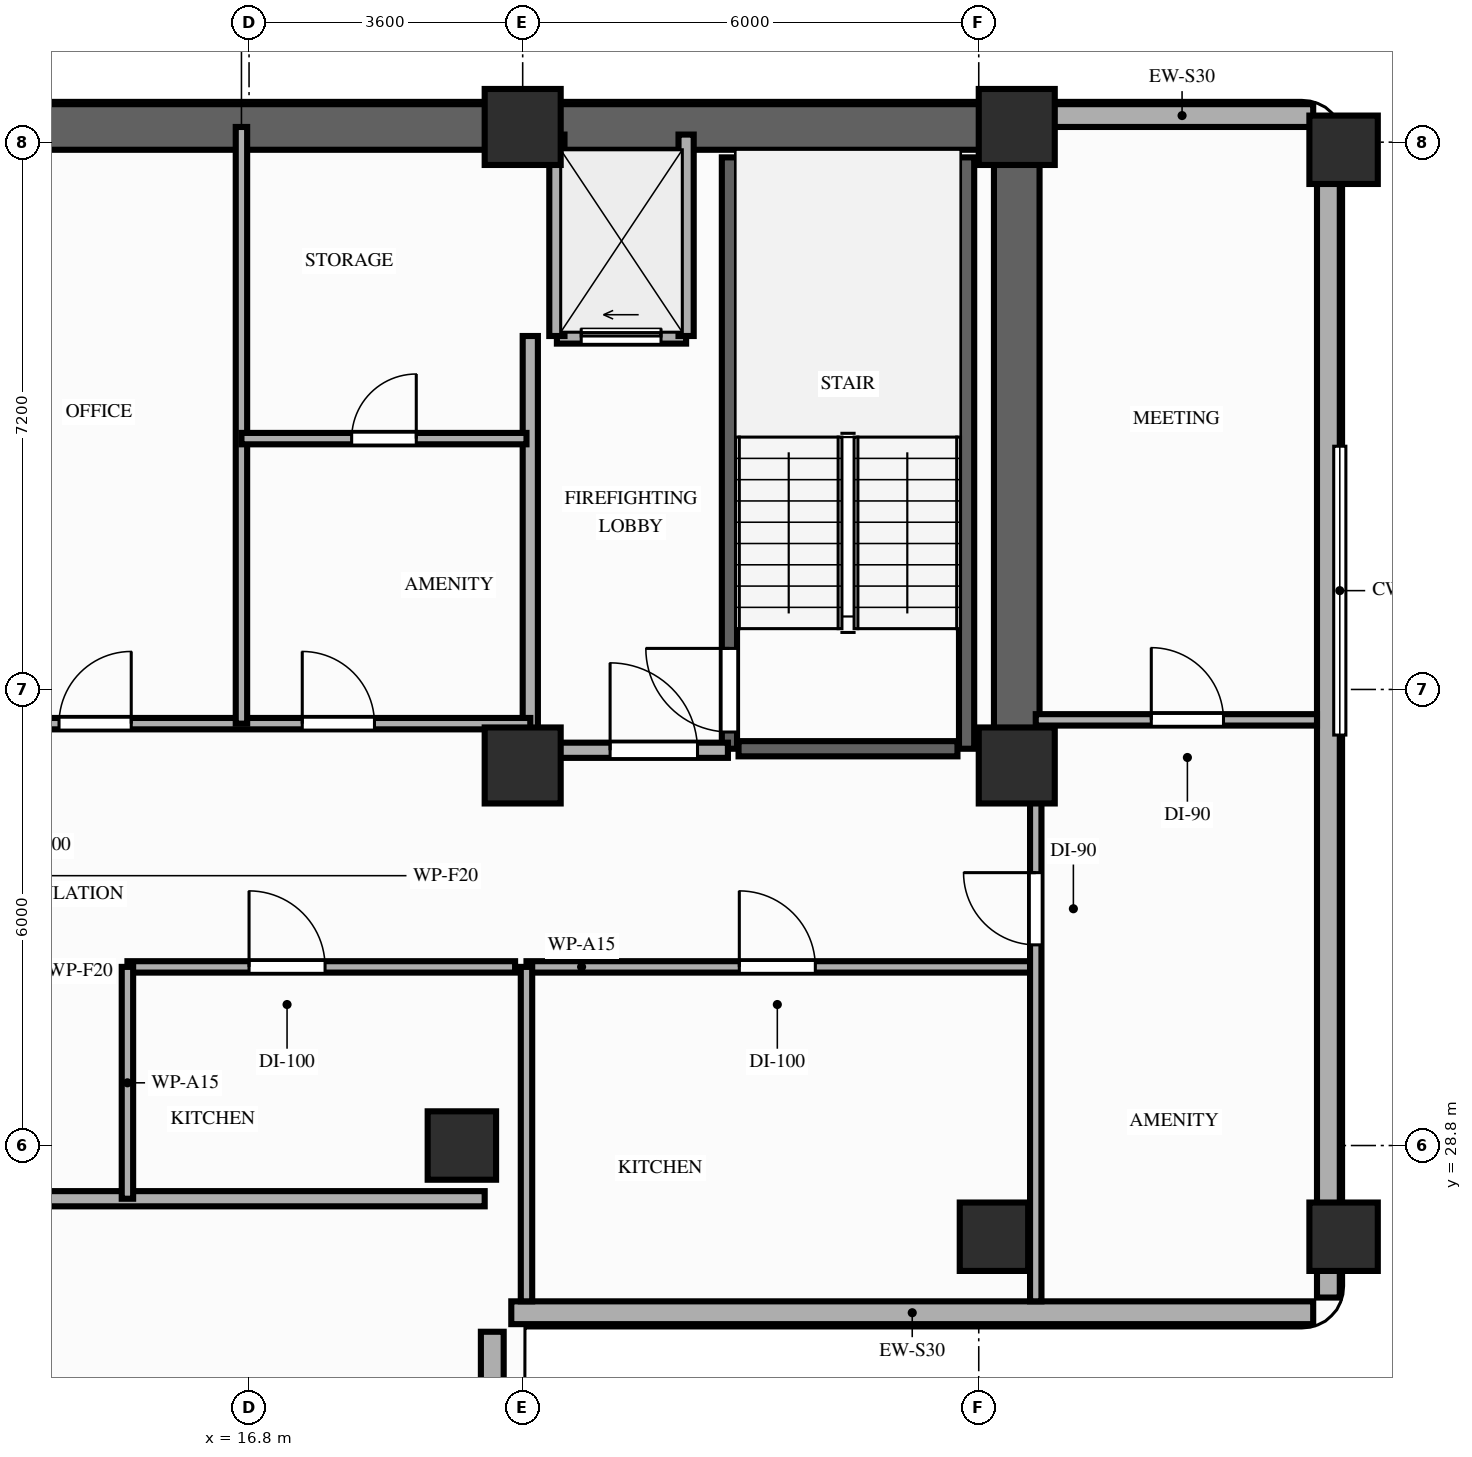
"""IFC4 building model, lengths in metres.
Left out: names, types, materials, properties, quantities, classifications, styles, units other than length and angle.
Written with IfcOpenShell. Run it as: python <this file> out.ifc"""

import sys

from ifc_helpers import new_model, si_unit, direction, frame, frame_2d, origin, origin_2d, place, context, subcontext, project, spatial, rectangle, extrude, element, fill, save


model = new_model("IFC4")
c1 = context("Model", 3, precision=1e-05, world=origin(), true_north=direction((0.0, 1.0)))
c2 = subcontext(c1, "Body", "Model", "MODEL_VIEW")
j1 = project(units=[si_unit("LENGTHUNIT", "METRE"), si_unit("PLANEANGLEUNIT", "RADIAN")], contexts=[c1])
p1 = place(None, origin())
s1 = spatial("IfcSite", under=j1, at=p1, CompositionType="ELEMENT")
p2 = place(p1, origin())
s2 = spatial("IfcBuilding", under=s1, at=p2, CompositionType="ELEMENT")
p3 = place(p2, frame((0.0, 0.0, 160.0)))
s3 = spatial("IfcBuildingStorey", under=s2, at=p3, CompositionType="ELEMENT", Elevation=160.0)
for number, where, z_axis, x_axis in (
    (1, (20.4, 33.8, 0.0), (0.0, 0.0, 1.0), (1.0, 0.0, 0.0)),
    (2, (26.9, 33.8, 0.0), (0.0, 0.0, 1.0), (1.0, 0.0, 0.0)),
    (3, (20.4, 42.2, 0.0), (0.0, 0.0, 1.0), (1.0, 0.0, 0.0)),
    (4, (26.9, 42.2, 0.0), (0.0, 0.0, 1.0), (1.0, 0.0, 0.0)),
):
    element("IfcColumn", number, at=place(p3, frame(where, z_axis=z_axis, x_axis=x_axis)), inside=s3, PredefinedType="COLUMN", context=c2, shape_type="SweptSolid", body=[
        extrude(rectangle(XDim=1.0, YDim=1.0, at=origin_2d()), origin(), (0.0, 0.0, 1.0), 3.2),
    ])
for number, where, z_axis, x_axis in (
    (5, (19.6, 28.8, 0.0), (0.0, 0.0, 1.0), (1.0, 0.0, 0.0)),
    (6, (26.6, 27.6, 0.0), (0.0, 0.0, 1.0), (1.0, 0.0, 0.0)),
    (7, (31.2, 27.6, 0.0), (0.0, 0.0, 1.0), (1.0, 0.0, 0.0)),
    (8, (31.2, 41.9, 0.0), (0.0, 0.0, 1.0), (1.0, 0.0, 0.0)),
):
    element("IfcColumn", number, at=place(p3, frame(where, z_axis=z_axis, x_axis=x_axis)), inside=s3, PredefinedType="COLUMN", context=c2, shape_type="SweptSolid", body=[
        extrude(rectangle(XDim=0.9, YDim=0.9, at=origin_2d()), origin(), (0.0, 0.0, 1.0), 3.2),
    ])
p4 = place(p3, frame((20.0, 8.8, 0.0), z_axis=(0.0, 0.0, 1.0), x_axis=(0.0, 1.0, 0.0)))
e9 = element("IfcWall", 9, at=p4, inside=s3, PredefinedType="STANDARD", context=c2, shape_type="SweptSolid", body=[
    extrude(rectangle(XDim=17.55, YDim=0.3, at=frame_2d((8.775, 0.0))), origin(), (0.0, 0.0, 1.0), 2.46),
])
p5 = place(p4, frame((1.84, 0.0, 0.85)))
e10 = element("IfcOpeningElement", 10, at=p5, cuts=e9, PredefinedType="OPENING", context=c2, shape_type="SweptSolid", body=[
    extrude(rectangle(XDim=1.1, YDim=1.36, at=frame_2d((0.55, 0.68))), frame((0.0, 0.16, 0.0), z_axis=(0.0, -1.0, 0.0), x_axis=(1.0, 0.0, 0.0)), (0.0, 0.0, 1.0), 0.32),
])
p6 = place(p4, frame((5.86, 0.0, 0.85)))
e11 = element("IfcOpeningElement", 11, at=p6, cuts=e9, PredefinedType="OPENING", context=c2, shape_type="SweptSolid", body=[
    extrude(rectangle(XDim=2.1, YDim=1.36, at=frame_2d((1.05, 0.68))), frame((0.0, 0.16, 0.0), z_axis=(0.0, -1.0, 0.0), x_axis=(1.0, 0.0, 0.0)), (0.0, 0.0, 1.0), 0.32),
])
p7 = place(p4, frame((10.85, 0.0, 0.85)))
e12 = element("IfcOpeningElement", 12, at=p7, cuts=e9, PredefinedType="OPENING", context=c2, shape_type="SweptSolid", body=[
    extrude(rectangle(XDim=2.1, YDim=1.36, at=frame_2d((1.05, 0.68))), frame((0.0, 0.16, 0.0), z_axis=(0.0, -1.0, 0.0), x_axis=(1.0, 0.0, 0.0)), (0.0, 0.0, 1.0), 0.32),
])
p8 = place(p3, frame((30.8, 42.35, 0.0), z_axis=(0.0, 0.0, 1.0), x_axis=(-1.0, 0.0, 0.0)))
e13 = element("IfcWall", 13, at=p8, inside=s3, PredefinedType="STANDARD", context=c2, shape_type="SweptSolid", body=[
    extrude(rectangle(XDim=3.45, YDim=0.3, at=frame_2d((1.725, 0.0))), origin(), (0.0, 0.0, 1.0), 2.46),
])
p9 = place(p3, frame((20.25, 26.6, 0.0), z_axis=(0.0, 0.0, 1.0), x_axis=(1.0, 0.0, 0.0)))
e14 = element("IfcWall", 14, at=p9, inside=s3, PredefinedType="STANDARD", context=c2, shape_type="SweptSolid", body=[
    extrude(rectangle(XDim=10.55, YDim=0.3, at=frame_2d((5.275, 0.0))), origin(), (0.0, 0.0, 1.0), 3.02),
])
p10 = place(p3, frame((31.0, 26.8, 0.0), z_axis=(0.0, 0.0, 1.0), x_axis=(0.0, 1.0, 0.0)))
e15 = element("IfcWall", 15, at=p10, inside=s3, PredefinedType="STANDARD", context=c2, shape_type="SweptSolid", body=[
    extrude(rectangle(XDim=15.35, YDim=0.3, at=frame_2d((7.675, 0.0))), origin(), (0.0, 0.0, 1.0), 2.46),
])
p11 = place(p3, frame((6.45, 42.2, 0.0), z_axis=(0.0, 0.0, 1.0), x_axis=(1.0, 0.0, 0.0)))
e16 = element("IfcWall", 16, at=p11, inside=s3, PredefinedType="SHEAR", context=c2, shape_type="SweptSolid", body=[
    extrude(rectangle(XDim=20.45, YDim=0.6, at=frame_2d((10.225, 0.0))), origin(), (0.0, 0.0, 1.0), 3.02),
])
p12 = place(p3, frame((26.9, 33.8, 0.0), z_axis=(0.0, 0.0, 1.0), x_axis=(0.0, 1.0, 0.0)))
e17 = element("IfcWall", 17, at=p12, inside=s3, PredefinedType="SHEAR", context=c2, shape_type="SweptSolid", body=[
    extrude(rectangle(XDim=7.95, YDim=0.6, at=frame_2d((3.975, 0.0))), origin(), (0.0, 0.0, 1.0), 3.02),
])
p13 = place(p3, frame((23.12, 34.02, 0.0), z_axis=(0.0, 0.0, 1.0), x_axis=(0.0, 1.0, 0.0)))
e18 = element("IfcWall", 18, at=p13, inside=s3, PredefinedType="SHEAR", context=c2, shape_type="SweptSolid", body=[
    extrude(rectangle(XDim=7.78, YDim=0.2, at=frame_2d((3.89, 0.0))), origin(), (0.0, 0.0, 1.0), 3.02),
])
p14 = place(p13, frame((0.22, 0.0, 0.0)))
e19 = element("IfcOpeningElement", 19, at=p14, cuts=e18, PredefinedType="OPENING", context=c2, shape_type="SweptSolid", body=[
    extrude(rectangle(XDim=1.1, YDim=2.15, at=frame_2d((0.55, 1.075))), frame((0.0, 0.11, 0.0), z_axis=(0.0, -1.0, 0.0), x_axis=(1.0, 0.0, 0.0)), (0.0, 0.0, 1.0), 0.22),
])
p15 = place(p3, frame((26.24, 34.02, 0.0), z_axis=(0.0, 0.0, 1.0), x_axis=(0.0, 1.0, 0.0)))
e20 = element("IfcWall", 20, at=p15, inside=s3, PredefinedType="SHEAR", context=c2, shape_type="SweptSolid", body=[
    extrude(rectangle(XDim=7.78, YDim=0.2, at=frame_2d((3.89, 0.0))), origin(), (0.0, 0.0, 1.0), 3.02),
])
p16 = place(p3, frame((23.24, 34.02, 0.0), z_axis=(0.0, 0.0, 1.0), x_axis=(1.0, 0.0, 0.0)))
e21 = element("IfcWall", 21, at=p16, inside=s3, PredefinedType="SHEAR", context=c2, shape_type="SweptSolid", body=[
    extrude(rectangle(XDim=2.88, YDim=0.2, at=frame_2d((1.44, 0.0))), origin(), (0.0, 0.0, 1.0), 3.02),
])
p17 = place(p3, frame((20.85, 39.45, 0.0), z_axis=(0.0, 0.0, 1.0), x_axis=(1.0, 0.0, 0.0)))
e22 = element("IfcWall", 22, at=p17, inside=s3, PredefinedType="MOVABLE", context=c2, shape_type="SweptSolid", body=[
    extrude(rectangle(XDim=1.7, YDim=0.2, at=frame_2d((0.85, 0.0))), origin(), (0.0, 0.0, 1.0), 3.02),
])
p18 = place(p17, frame((0.32, 0.0, 0.0)))
e23 = element("IfcOpeningElement", 23, at=p18, cuts=e22, PredefinedType="OPENING", context=c2, shape_type="SweptSolid", body=[
    extrude(rectangle(XDim=1.05, YDim=2.15, at=frame_2d((0.525, 1.075))), frame((0.0, 0.11, 0.0), z_axis=(0.0, -1.0, 0.0), x_axis=(1.0, 0.0, 0.0)), (0.0, 0.0, 1.0), 0.22),
])
for number, where, z_axis, x_axis in (
    (24, (20.85, 39.45, 0.0), (0.0, 0.0, 1.0), (0.0, 1.0, 0.0)),
    (25, (22.55, 39.45, 0.0), (0.0, 0.0, 1.0), (0.0, 1.0, 0.0)),
):
    element("IfcWall", number, at=place(p3, frame(where, z_axis=z_axis, x_axis=x_axis)), inside=s3, PredefinedType="MOVABLE", context=c2, shape_type="SweptSolid", body=[
        extrude(rectangle(XDim=2.65, YDim=0.2, at=frame_2d((1.325, 0.0))), origin(), (0.0, 0.0, 1.0), 2.46),
    ])
p19 = place(p3, frame((20.5, 34.0, 0.0), z_axis=(0.0, 0.0, 1.0), x_axis=(0.0, 1.0, 0.0)))
e26 = element("IfcWall", 26, at=p19, inside=s3, PredefinedType="PARTITIONING", context=c2, shape_type="SweptSolid", body=[
    extrude(rectangle(XDim=5.45, YDim=0.2, at=frame_2d((2.725, 0.0))), origin(), (0.0, 0.0, 1.0), 2.46),
])
p20 = place(p3, frame((20.5, 34.0, 0.0), z_axis=(0.0, 0.0, 1.0), x_axis=(1.0, 0.0, 0.0)))
e27 = element("IfcWall", 27, at=p20, inside=s3, PredefinedType="PARTITIONING", context=c2, shape_type="SweptSolid", body=[
    extrude(rectangle(XDim=2.6, YDim=0.2, at=frame_2d((1.3, 0.0))), origin(), (0.0, 0.0, 1.0), 2.46),
])
p21 = place(p20, frame((1.05, 0.0, 0.0)))
e28 = element("IfcOpeningElement", 28, at=p21, cuts=e27, PredefinedType="OPENING", context=c2, shape_type="SweptSolid", body=[
    extrude(rectangle(XDim=1.15, YDim=2.15, at=frame_2d((0.575, 1.075))), frame((0.0, 0.11, 0.0), z_axis=(0.0, -1.0, 0.0), x_axis=(1.0, 0.0, 0.0)), (0.0, 0.0, 1.0), 0.22),
])
p22 = place(p3, frame((12.9, 34.35, 0.0), z_axis=(0.0, 0.0, 1.0), x_axis=(1.0, 0.0, 0.0)))
e29 = element("IfcWall", 29, at=p22, inside=s3, PredefinedType="PARTITIONING", context=c2, shape_type="SweptSolid", body=[
    extrude(rectangle(XDim=7.6, YDim=0.15, at=frame_2d((3.8, 0.0))), origin(), (0.0, 0.0, 1.0), 3.02),
])
p23 = place(p22, frame((1.4, 0.0, 0.0)))
e30 = element("IfcOpeningElement", 30, at=p23, cuts=e29, PredefinedType="OPENING", context=c2, shape_type="SweptSolid", body=[
    extrude(rectangle(XDim=0.95, YDim=2.15, at=frame_2d((0.475, 1.075))), frame((0.0, 0.085, 0.0), z_axis=(0.0, -1.0, 0.0), x_axis=(1.0, 0.0, 0.0)), (0.0, 0.0, 1.0), 0.17),
])
p24 = place(p22, frame((4.6, 0.0, 0.0)))
e31 = element("IfcOpeningElement", 31, at=p24, cuts=e29, PredefinedType="OPENING", context=c2, shape_type="SweptSolid", body=[
    extrude(rectangle(XDim=0.95, YDim=2.15, at=frame_2d((0.475, 1.075))), frame((0.0, 0.085, 0.0), z_axis=(0.0, -1.0, 0.0), x_axis=(1.0, 0.0, 0.0)), (0.0, 0.0, 1.0), 0.17),
])
p25 = place(p3, frame((16.7, 34.35, 0.0), z_axis=(0.0, 0.0, 1.0), x_axis=(0.0, 1.0, 0.0)))
e32 = element("IfcWall", 32, at=p25, inside=s3, PredefinedType="PARTITIONING", context=c2, shape_type="SweptSolid", body=[
    extrude(rectangle(XDim=7.85, YDim=0.15, at=frame_2d((3.925, 0.0))), origin(), (0.0, 0.0, 1.0), 2.46),
])
p26 = place(p3, frame((16.7, 38.1, 0.0), z_axis=(0.0, 0.0, 1.0), x_axis=(1.0, 0.0, 0.0)))
e33 = element("IfcWall", 33, at=p26, inside=s3, PredefinedType="PARTITIONING", context=c2, shape_type="SweptSolid", body=[
    extrude(rectangle(XDim=3.75, YDim=0.15, at=frame_2d((1.875, 0.0))), origin(), (0.0, 0.0, 1.0), 3.02),
])
p27 = place(p26, frame((1.45, 0.0, 0.0)))
e34 = element("IfcOpeningElement", 34, at=p27, cuts=e33, PredefinedType="OPENING", context=c2, shape_type="SweptSolid", body=[
    extrude(rectangle(XDim=0.85, YDim=2.05, at=frame_2d((0.425, 1.025))), frame((0.0, 0.085, 0.0), z_axis=(0.0, -1.0, 0.0), x_axis=(1.0, 0.0, 0.0)), (0.0, 0.0, 1.0), 0.17),
])
p28 = place(p3, frame((12.83, 28.1, 0.0), z_axis=(0.0, 0.0, 1.0), x_axis=(1.0, 0.0, 0.0)))
e35 = element("IfcWall", 35, at=p28, inside=s3, PredefinedType="PARTITIONING", context=c2, shape_type="SweptSolid", body=[
    extrude(rectangle(XDim=7.07, YDim=0.2, at=frame_2d((3.535, 0.0))), origin(), (0.0, 0.0, 1.0), 2.46),
])
p29 = place(p3, frame((15.2, 31.15, 0.0), z_axis=(0.0, 0.0, 1.0), x_axis=(1.0, 0.0, 0.0)))
e36 = element("IfcWall", 36, at=p29, inside=s3, PredefinedType="PARTITIONING", context=c2, shape_type="SweptSolid", body=[
    extrude(rectangle(XDim=5.1, YDim=0.15, at=frame_2d((2.55, 0.0))), origin(), (0.0, 0.0, 1.0), 2.46),
])
p30 = place(p29, frame((1.6, 0.0, 0.0)))
e37 = element("IfcOpeningElement", 37, at=p30, cuts=e36, PredefinedType="OPENING", context=c2, shape_type="SweptSolid", body=[
    extrude(rectangle(XDim=1.0, YDim=2.15, at=frame_2d((0.5, 1.075))), frame((0.0, 0.085, 0.0), z_axis=(0.0, -1.0, 0.0), x_axis=(1.0, 0.0, 0.0)), (0.0, 0.0, 1.0), 0.17),
])
p31 = place(p3, frame((15.2, 28.1, 0.0), z_axis=(0.0, 0.0, 1.0), x_axis=(0.0, 1.0, 0.0)))
e38 = element("IfcWall", 38, at=p31, inside=s3, PredefinedType="PARTITIONING", context=c2, shape_type="SweptSolid", body=[
    extrude(rectangle(XDim=3.05, YDim=0.15, at=frame_2d((1.525, 0.0))), origin(), (0.0, 0.0, 1.0), 2.46),
])
p32 = place(p3, frame((20.45, 31.15, 0.0), z_axis=(0.0, 0.0, 1.0), x_axis=(1.0, 0.0, 0.0)))
e39 = element("IfcWall", 39, at=p32, inside=s3, PredefinedType="PARTITIONING", context=c2, shape_type="SweptSolid", body=[
    extrude(rectangle(XDim=6.7, YDim=0.15, at=frame_2d((3.35, 0.0))), origin(), (0.0, 0.0, 1.0), 3.02),
])
p33 = place(p32, frame((2.8, 0.0, 0.0)))
e40 = element("IfcOpeningElement", 40, at=p33, cuts=e39, PredefinedType="OPENING", context=c2, shape_type="SweptSolid", body=[
    extrude(rectangle(XDim=1.0, YDim=2.15, at=frame_2d((0.5, 1.075))), frame((0.0, 0.085, 0.0), z_axis=(0.0, -1.0, 0.0), x_axis=(1.0, 0.0, 0.0)), (0.0, 0.0, 1.0), 0.17),
])
p34 = place(p3, frame((20.45, 26.75, 0.0), z_axis=(0.0, 0.0, 1.0), x_axis=(0.0, 1.0, 0.0)))
e41 = element("IfcWall", 41, at=p34, inside=s3, PredefinedType="PARTITIONING", context=c2, shape_type="SweptSolid", body=[
    extrude(rectangle(XDim=4.4, YDim=0.15, at=frame_2d((2.2, 0.0))), origin(), (0.0, 0.0, 1.0), 2.46),
])
p35 = place(p3, frame((27.15, 26.75, 0.0), z_axis=(0.0, 0.0, 1.0), x_axis=(0.0, 1.0, 0.0)))
e42 = element("IfcWall", 42, at=p35, inside=s3, PredefinedType="PARTITIONING", context=c2, shape_type="SweptSolid", body=[
    extrude(rectangle(XDim=6.93, YDim=0.15, at=frame_2d((3.465, 0.0))), origin(), (0.0, 0.0, 1.0), 2.46),
])
p36 = place(p35, frame((4.69, 0.0, 0.0)))
e43 = element("IfcOpeningElement", 43, at=p36, cuts=e42, PredefinedType="OPENING", context=c2, shape_type="SweptSolid", body=[
    extrude(rectangle(XDim=0.95, YDim=2.15, at=frame_2d((0.475, 1.075))), frame((0.0, 0.085, 0.0), z_axis=(0.0, -1.0, 0.0), x_axis=(1.0, 0.0, 0.0)), (0.0, 0.0, 1.0), 0.17),
])
p37 = place(p3, frame((27.15, 34.4, 0.0), z_axis=(0.0, 0.0, 1.0), x_axis=(1.0, 0.0, 0.0)))
e44 = element("IfcWall", 44, at=p37, inside=s3, PredefinedType="PARTITIONING", context=c2, shape_type="SweptSolid", body=[
    extrude(rectangle(XDim=3.7, YDim=0.15, at=frame_2d((1.85, 0.0))), origin(), (0.0, 0.0, 1.0), 2.46),
])
p38 = place(p37, frame((1.52, 0.0, 0.0)))
e45 = element("IfcOpeningElement", 45, at=p38, cuts=e44, PredefinedType="OPENING", context=c2, shape_type="SweptSolid", body=[
    extrude(rectangle(XDim=0.95, YDim=2.15, at=frame_2d((0.475, 1.075))), frame((0.0, 0.085, 0.0), z_axis=(0.0, -1.0, 0.0), x_axis=(1.0, 0.0, 0.0)), (0.0, 0.0, 1.0), 0.17),
])
p39 = place(p14, origin())
e46 = element("IfcDoor", 46, at=p39, inside=s3, OperationType="SINGLE_SWING_RIGHT", PredefinedType="DOOR", context=c2, shape_type="SweptSolid", body=[
    extrude(rectangle(XDim=1.1, YDim=2.15, at=frame_2d((0.55, 1.075))), frame((0.0, 0.025, 0.0), z_axis=(0.0, -1.0, 0.0), x_axis=(1.0, 0.0, 0.0)), (0.0, 0.0, 1.0), 0.05),
])
fill(e19, e46)
p40 = place(p18, origin())
e47 = element("IfcDoor", 47, at=p40, inside=s3, OperationType="SLIDING_TO_LEFT", PredefinedType="DOOR", context=c2, shape_type="SweptSolid", body=[
    extrude(rectangle(XDim=1.05, YDim=2.15, at=frame_2d((0.525, 1.075))), frame((0.0, 0.025, 0.0), z_axis=(0.0, -1.0, 0.0), x_axis=(1.0, 0.0, 0.0)), (0.0, 0.0, 1.0), 0.05),
])
fill(e23, e47)
p41 = place(p21, origin())
e48 = element("IfcDoor", 48, at=p41, inside=s3, OperationType="SINGLE_SWING_LEFT", PredefinedType="DOOR", context=c2, shape_type="SweptSolid", body=[
    extrude(rectangle(XDim=1.15, YDim=2.15, at=frame_2d((0.575, 1.075))), frame((0.0, 0.025, 0.0), z_axis=(0.0, -1.0, 0.0), x_axis=(1.0, 0.0, 0.0)), (0.0, 0.0, 1.0), 0.05),
])
fill(e28, e48)
p42 = place(p23, origin())
e49 = element("IfcDoor", 49, at=p42, inside=s3, OperationType="SINGLE_SWING_RIGHT", PredefinedType="DOOR", context=c2, shape_type="SweptSolid", body=[
    extrude(rectangle(XDim=0.95, YDim=2.15, at=frame_2d((0.475, 1.075))), frame((0.0, 0.025, 0.0), z_axis=(0.0, -1.0, 0.0), x_axis=(1.0, 0.0, 0.0)), (0.0, 0.0, 1.0), 0.05),
])
fill(e30, e49)
p43 = place(p24, origin())
e50 = element("IfcDoor", 50, at=p43, inside=s3, OperationType="SINGLE_SWING_LEFT", PredefinedType="DOOR", context=c2, shape_type="SweptSolid", body=[
    extrude(rectangle(XDim=0.95, YDim=2.15, at=frame_2d((0.475, 1.075))), frame((0.0, 0.025, 0.0), z_axis=(0.0, -1.0, 0.0), x_axis=(1.0, 0.0, 0.0)), (0.0, 0.0, 1.0), 0.05),
])
fill(e31, e50)
p44 = place(p27, origin())
e51 = element("IfcDoor", 51, at=p44, inside=s3, OperationType="SINGLE_SWING_RIGHT", PredefinedType="DOOR", context=c2, shape_type="SweptSolid", body=[
    extrude(rectangle(XDim=0.85, YDim=2.05, at=frame_2d((0.425, 1.025))), frame((0.0, 0.025, 0.0), z_axis=(0.0, -1.0, 0.0), x_axis=(1.0, 0.0, 0.0)), (0.0, 0.0, 1.0), 0.05),
])
fill(e34, e51)
p45 = place(p30, origin())
e52 = element("IfcDoor", 52, at=p45, inside=s3, OperationType="SINGLE_SWING_LEFT", PredefinedType="DOOR", context=c2, shape_type="SweptSolid", body=[
    extrude(rectangle(XDim=1.0, YDim=2.15, at=frame_2d((0.5, 1.075))), frame((0.0, 0.025, 0.0), z_axis=(0.0, -1.0, 0.0), x_axis=(1.0, 0.0, 0.0)), (0.0, 0.0, 1.0), 0.05),
])
fill(e37, e52)
p46 = place(p33, origin())
e53 = element("IfcDoor", 53, at=p46, inside=s3, OperationType="SINGLE_SWING_LEFT", PredefinedType="DOOR", context=c2, shape_type="SweptSolid", body=[
    extrude(rectangle(XDim=1.0, YDim=2.15, at=frame_2d((0.5, 1.075))), frame((0.0, 0.025, 0.0), z_axis=(0.0, -1.0, 0.0), x_axis=(1.0, 0.0, 0.0)), (0.0, 0.0, 1.0), 0.05),
])
fill(e40, e53)
p47 = place(p36, origin())
e54 = element("IfcDoor", 54, at=p47, inside=s3, OperationType="SINGLE_SWING_RIGHT", PredefinedType="DOOR", context=c2, shape_type="SweptSolid", body=[
    extrude(rectangle(XDim=0.95, YDim=2.15, at=frame_2d((0.475, 1.075))), frame((0.0, 0.025, 0.0), z_axis=(0.0, -1.0, 0.0), x_axis=(1.0, 0.0, 0.0)), (0.0, 0.0, 1.0), 0.05),
])
fill(e43, e54)
p48 = place(p38, origin())
e55 = element("IfcDoor", 55, at=p48, inside=s3, OperationType="SINGLE_SWING_LEFT", PredefinedType="DOOR", context=c2, shape_type="SweptSolid", body=[
    extrude(rectangle(XDim=0.95, YDim=2.15, at=frame_2d((0.475, 1.075))), frame((0.0, 0.025, 0.0), z_axis=(0.0, -1.0, 0.0), x_axis=(1.0, 0.0, 0.0)), (0.0, 0.0, 1.0), 0.05),
])
fill(e45, e55)
save(model, sys.argv[1])
